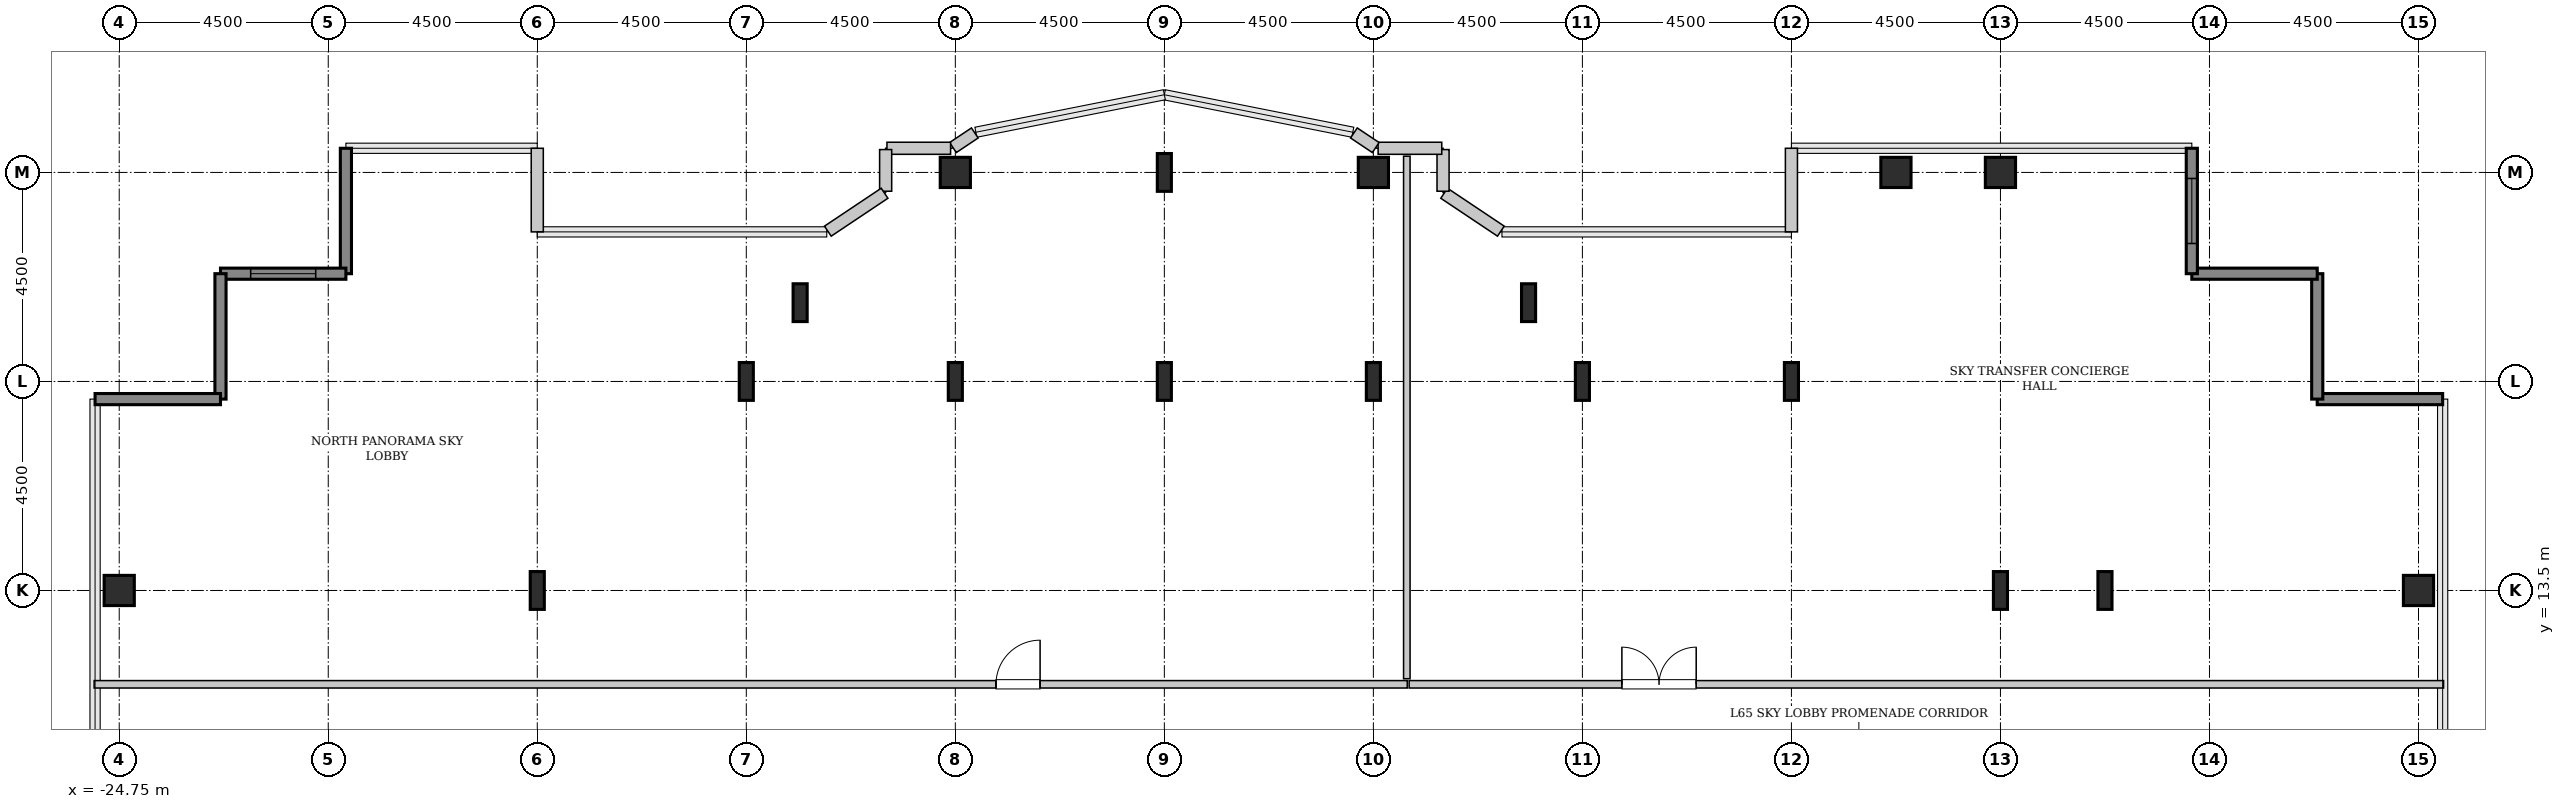
"""IFC4 building model, lengths in metres.
Left out: names, types, materials, properties, quantities, classifications, styles, units other than length and angle.
Written with IfcOpenShell. Run it as: python <this file> out.ifc"""

import sys

from ifc_helpers import new_model, si_unit, direction, frame, frame_2d, origin, origin_2d, place, context, subcontext, project, spatial, rectangle, hollow_rectangle, i_section, extrude, source, transform, mapped, element, fill, save


model = new_model("IFC4")
c1 = context("Model", 3, precision=1e-05, world=origin(), true_north=direction((0.0, 1.0)))
c2 = subcontext(c1, "Body", "Model", "MODEL_VIEW")
j1 = project(units=[si_unit("LENGTHUNIT", "METRE"), si_unit("PLANEANGLEUNIT", "RADIAN")], contexts=[c1])
p1 = place(None, origin())
s1 = spatial("IfcSite", under=j1, at=p1, CompositionType="ELEMENT")
p2 = place(p1, origin())
s2 = spatial("IfcBuilding", under=s1, at=p2, CompositionType="ELEMENT")
p3 = place(p2, frame((0.0, 0.0, 259.8)))
s3 = spatial("IfcBuildingStorey", under=s2, at=p3, CompositionType="ELEMENT", Elevation=259.8)
m1 = source(origin(), c2, "Body", "SweptSolid", [
    extrude(hollow_rectangle(XDim=0.65, YDim=0.65, WallThickness=0.032, InnerFilletRadius=0.032, OuterFilletRadius=0.064, at=origin_2d()), origin(), (0.0, 0.0, 1.0), 4.8),
])
p4 = place(p3, frame((-24.75, 13.5, 0.0), z_axis=(0.0, 0.0, 1.0), x_axis=(1.0, 0.0, 0.0)))
e1 = element("IfcColumn", 1, at=p4, inside=s3, PredefinedType="COLUMN", context=c2, shape_type="MappedRepresentation", body=[
    mapped(m1, transform((0.0, 0.0, 0.0), x_axis=(1.0, 0.0, 0.0), y_axis=(0.0, 1.0, 0.0), z_axis=(0.0, 0.0, 1.0), scale=1.0)),
])
m2 = source(origin(), c2, "Body", "SweptSolid", [
    extrude(i_section(OverallWidth=0.303, OverallDepth=0.814, WebThickness=0.021, FlangeThickness=0.04, FilletRadius=0.03, at=origin_2d()), origin(), (0.0, 0.0, 1.0), 4.8),
])
for number, where, z_axis, x_axis in (
    (2, (-15.75, 13.5, 0.0), (0.0, 0.0, 1.0), (1.0, 0.0, 0.0)),
    (3, (-11.25, 18.0, 0.0), (0.0, 0.0, 1.0), (1.0, 0.0, 0.0)),
    (4, (-10.091, 19.696, 0.0), (0.0, 0.0, 1.0), (1.0, 0.0, 0.0)),
    (5, (-6.75, 18.0, 0.0), (0.0, 0.0, 1.0), (1.0, 0.0, 0.0)),
):
    element("IfcColumn", number, at=place(p3, frame(where, z_axis=z_axis, x_axis=x_axis)), inside=s3, PredefinedType="COLUMN", context=c2, shape_type="MappedRepresentation", body=[
        mapped(m2, transform((0.0, 0.0, 0.0), x_axis=(1.0, 0.0, 0.0), y_axis=(0.0, 1.0, 0.0), z_axis=(0.0, 0.0, 1.0), scale=1.0)),
    ])
p5 = place(p3, frame((-6.75, 22.5, 0.0), z_axis=(0.0, 0.0, 1.0), x_axis=(1.0, 0.0, 0.0)))
e6 = element("IfcColumn", 6, at=p5, inside=s3, PredefinedType="COLUMN", context=c2, shape_type="MappedRepresentation", body=[
    mapped(m1, transform((0.0, 0.0, 0.0), x_axis=(1.0, 0.0, 0.0), y_axis=(0.0, 1.0, 0.0), z_axis=(0.0, 0.0, 1.0), scale=1.0)),
])
for number, where, z_axis, x_axis in (
    (7, (-2.25, 18.0, 0.0), (0.0, 0.0, 1.0), (1.0, 0.0, 0.0)),
    (8, (-2.25, 22.5, 0.0), (0.0, 0.0, 1.0), (1.0, 0.0, 0.0)),
    (9, (2.25, 18.0, 0.0), (0.0, 0.0, 1.0), (1.0, 0.0, 0.0)),
):
    element("IfcColumn", number, at=place(p3, frame(where, z_axis=z_axis, x_axis=x_axis)), inside=s3, PredefinedType="COLUMN", context=c2, shape_type="MappedRepresentation", body=[
        mapped(m2, transform((0.0, 0.0, 0.0), x_axis=(1.0, 0.0, 0.0), y_axis=(0.0, 1.0, 0.0), z_axis=(0.0, 0.0, 1.0), scale=1.0)),
    ])
p6 = place(p3, frame((2.25, 22.5, 0.0), z_axis=(0.0, 0.0, 1.0), x_axis=(1.0, 0.0, 0.0)))
e10 = element("IfcColumn", 10, at=p6, inside=s3, PredefinedType="COLUMN", context=c2, shape_type="MappedRepresentation", body=[
    mapped(m1, transform((0.0, 0.0, 0.0), x_axis=(1.0, 0.0, 0.0), y_axis=(0.0, 1.0, 0.0), z_axis=(0.0, 0.0, 1.0), scale=1.0)),
])
for number, where, z_axis, x_axis in (
    (11, (5.591, 19.696, 0.0), (0.0, 0.0, 1.0), (1.0, 0.0, 0.0)),
    (12, (6.75, 18.0, 0.0), (0.0, 0.0, 1.0), (1.0, 0.0, 0.0)),
    (13, (11.25, 18.0, 0.0), (0.0, 0.0, 1.0), (1.0, 0.0, 0.0)),
):
    element("IfcColumn", number, at=place(p3, frame(where, z_axis=z_axis, x_axis=x_axis)), inside=s3, PredefinedType="COLUMN", context=c2, shape_type="MappedRepresentation", body=[
        mapped(m2, transform((0.0, 0.0, 0.0), x_axis=(1.0, 0.0, 0.0), y_axis=(0.0, 1.0, 0.0), z_axis=(0.0, 0.0, 1.0), scale=1.0)),
    ])
p7 = place(p3, frame((13.5, 22.5, 0.0), z_axis=(0.0, 0.0, 1.0), x_axis=(1.0, 0.0, 0.0)))
e14 = element("IfcColumn", 14, at=p7, inside=s3, PredefinedType="COLUMN", context=c2, shape_type="MappedRepresentation", body=[
    mapped(m1, transform((0.0, 0.0, 0.0), x_axis=(1.0, 0.0, 0.0), y_axis=(0.0, 1.0, 0.0), z_axis=(0.0, 0.0, 1.0), scale=1.0)),
])
p8 = place(p3, frame((15.75, 13.5, 0.0), z_axis=(0.0, 0.0, 1.0), x_axis=(1.0, 0.0, 0.0)))
e15 = element("IfcColumn", 15, at=p8, inside=s3, PredefinedType="COLUMN", context=c2, shape_type="MappedRepresentation", body=[
    mapped(m2, transform((0.0, 0.0, 0.0), x_axis=(1.0, 0.0, 0.0), y_axis=(0.0, 1.0, 0.0), z_axis=(0.0, 0.0, 1.0), scale=1.0)),
])
p9 = place(p3, frame((15.75, 22.5, 0.0), z_axis=(0.0, 0.0, 1.0), x_axis=(1.0, 0.0, 0.0)))
e16 = element("IfcColumn", 16, at=p9, inside=s3, PredefinedType="COLUMN", context=c2, shape_type="MappedRepresentation", body=[
    mapped(m1, transform((0.0, 0.0, 0.0), x_axis=(1.0, 0.0, 0.0), y_axis=(0.0, 1.0, 0.0), z_axis=(0.0, 0.0, 1.0), scale=1.0)),
])
p10 = place(p3, frame((18.0, 13.5, 0.0), z_axis=(0.0, 0.0, 1.0), x_axis=(1.0, 0.0, 0.0)))
e17 = element("IfcColumn", 17, at=p10, inside=s3, PredefinedType="COLUMN", context=c2, shape_type="MappedRepresentation", body=[
    mapped(m2, transform((0.0, 0.0, 0.0), x_axis=(1.0, 0.0, 0.0), y_axis=(0.0, 1.0, 0.0), z_axis=(0.0, 0.0, 1.0), scale=1.0)),
])
p11 = place(p3, frame((24.75, 13.5, 0.0), z_axis=(0.0, 0.0, 1.0), x_axis=(1.0, 0.0, 0.0)))
e18 = element("IfcColumn", 18, at=p11, inside=s3, PredefinedType="COLUMN", context=c2, shape_type="MappedRepresentation", body=[
    mapped(m1, transform((0.0, 0.0, 0.0), x_axis=(1.0, 0.0, 0.0), y_axis=(0.0, 1.0, 0.0), z_axis=(0.0, 0.0, 1.0), scale=1.0)),
])
m3 = source(origin(), c2, "Body", "SweptSolid", [
    extrude(rectangle(XDim=2.7, YDim=0.24, at=frame_2d((1.35, 0.0))), origin(), (0.0, 0.0, 1.0), 4.55),
])
for number, where, z_axis, x_axis in (
    (19, (25.27, 17.62, 0.0), (0.0, 0.0, 1.0), (-1.0, 0.0, 0.0)),
    (20, (22.57, 17.62, 0.0), (0.0, 0.0, 1.0), (0.0, 1.0, 0.0)),
    (21, (22.57, 20.32, 0.0), (0.0, 0.0, 1.0), (-1.0, 0.0, 0.0)),
):
    element("IfcWall", number, at=place(p3, frame(where, z_axis=z_axis, x_axis=x_axis)), inside=s3, PredefinedType="SHEAR", context=c2, shape_type="MappedRepresentation", body=[
        mapped(m3, transform((0.0, 0.0, 0.0), x_axis=(1.0, 0.0, 0.0), y_axis=(0.0, 1.0, 0.0), z_axis=(0.0, 0.0, 1.0), scale=1.0)),
    ])
p12 = place(p3, frame((19.87, 20.32, 0.0), z_axis=(0.0, 0.0, 1.0), x_axis=(0.0, 1.0, 0.0)))
e22 = element("IfcWall", 22, at=p12, inside=s3, PredefinedType="SHEAR", context=c2, shape_type="MappedRepresentation", body=[
    mapped(m3, transform((0.0, 0.0, 0.0), x_axis=(1.0, 0.0, 0.0), y_axis=(0.0, 1.0, 0.0), z_axis=(0.0, 0.0, 1.0), scale=1.0)),
])
p13 = place(p12, frame((0.65, 0.0, 0.85)))
e23 = element("IfcOpeningElement", 23, at=p13, cuts=e22, PredefinedType="OPENING", context=c2, shape_type="SweptSolid", body=[
    extrude(rectangle(XDim=1.4, YDim=1.8, at=frame_2d((0.7, 0.9))), frame((0.0, 0.13, 0.0), z_axis=(0.0, -1.0, 0.0), x_axis=(1.0, 0.0, 0.0)), (0.0, 0.0, 1.0), 0.26),
])
m4 = source(origin(), c2, "Body", "SweptSolid", [
    extrude(rectangle(XDim=1.8, YDim=0.26, at=frame_2d((0.9, 0.0))), origin(), (0.0, 0.0, 1.0), 4.55),
])
p14 = place(p3, frame((11.25, 23.02, 0.0), z_axis=(0.0, 0.0, 1.0), x_axis=(0.0, -1.0, 0.0)))
e24 = element("IfcWall", 24, at=p14, inside=s3, PredefinedType="SOLIDWALL", context=c2, shape_type="MappedRepresentation", body=[
    mapped(m4, transform((0.0, 0.0, 0.0), x_axis=(1.0, 0.0, 0.0), y_axis=(0.0, 1.0, 0.0), z_axis=(0.0, 0.0, 1.0), scale=1.0)),
])
m5 = source(origin(), c2, "Body", "SweptSolid", [
    extrude(rectangle(XDim=1.469, YDim=0.26, at=frame_2d((0.734, 0.0))), origin(), (0.0, 0.0, 1.0), 4.55),
])
p15 = place(p3, frame((4.995, 21.236, 0.0), z_axis=(0.0, 0.0, 1.0), x_axis=(-0.831461760506, 0.555581983884, 0.0)))
e25 = element("IfcWall", 25, at=p15, inside=s3, PredefinedType="SOLIDWALL", context=c2, shape_type="MappedRepresentation", body=[
    mapped(m5, transform((0.0, 0.0, 0.0), x_axis=(1.0, 0.0, 0.0), y_axis=(0.0, 1.0, 0.0), z_axis=(0.0, 0.0, 1.0), scale=1.0)),
])
m6 = source(origin(), c2, "Body", "SweptSolid", [
    extrude(rectangle(XDim=0.897, YDim=0.26, at=frame_2d((0.448, 0.0))), origin(), (0.0, 0.0, 1.0), 4.55),
])
p16 = place(p3, frame((3.75, 22.095, 0.0), z_axis=(0.0, 0.0, 1.0), x_axis=(0.0, 1.0, 0.0)))
e26 = element("IfcWall", 26, at=p16, inside=s3, PredefinedType="SOLIDWALL", context=c2, shape_type="MappedRepresentation", body=[
    mapped(m6, transform((0.0, 0.0, 0.0), x_axis=(1.0, 0.0, 0.0), y_axis=(0.0, 1.0, 0.0), z_axis=(0.0, 0.0, 1.0), scale=1.0)),
])
m7 = source(origin(), c2, "Body", "SweptSolid", [
    extrude(rectangle(XDim=1.37, YDim=0.26, at=frame_2d((0.685, 0.0))), origin(), (0.0, 0.0, 1.0), 4.55),
])
p17 = place(p3, frame((3.722, 23.02, 0.0), z_axis=(0.0, 0.0, 1.0), x_axis=(-1.0, 0.0, 0.0)))
e27 = element("IfcWall", 27, at=p17, inside=s3, PredefinedType="SOLIDWALL", context=c2, shape_type="MappedRepresentation", body=[
    mapped(m7, transform((0.0, 0.0, 0.0), x_axis=(1.0, 0.0, 0.0), y_axis=(0.0, 1.0, 0.0), z_axis=(0.0, 0.0, 1.0), scale=1.0)),
])
m8 = source(origin(), c2, "Body", "SweptSolid", [
    extrude(rectangle(XDim=0.565, YDim=0.26, at=frame_2d((0.283, 0.0))), origin(), (0.0, 0.0, 1.0), 4.55),
])
for number, where, z_axis, x_axis in (
    (28, (2.301, 23.036, 0.0), (0.0, 0.0, 1.0), (-0.832, 0.555, 0.0)),
    (29, (-6.331, 23.35, 0.0), (0.0, 0.0, 1.0), (-0.832, -0.555, 0.0)),
):
    element("IfcWall", number, at=place(p3, frame(where, z_axis=z_axis, x_axis=x_axis)), inside=s3, PredefinedType="SOLIDWALL", context=c2, shape_type="MappedRepresentation", body=[
        mapped(m8, transform((0.0, 0.0, 0.0), x_axis=(1.0, 0.0, 0.0), y_axis=(0.0, 1.0, 0.0), z_axis=(0.0, 0.0, 1.0), scale=1.0)),
    ])
p18 = place(p3, frame((-6.852, 23.02, 0.0), z_axis=(0.0, 0.0, 1.0), x_axis=(-1.0, 0.0, 0.0)))
e30 = element("IfcWall", 30, at=p18, inside=s3, PredefinedType="SOLIDWALL", context=c2, shape_type="MappedRepresentation", body=[
    mapped(m7, transform((0.0, 0.0, 0.0), x_axis=(1.0, 0.0, 0.0), y_axis=(0.0, 1.0, 0.0), z_axis=(0.0, 0.0, 1.0), scale=1.0)),
])
p19 = place(p3, frame((-8.25, 22.992, 0.0), z_axis=(0.0, 0.0, 1.0), x_axis=(0.0, -1.0, 0.0)))
e31 = element("IfcWall", 31, at=p19, inside=s3, PredefinedType="SOLIDWALL", context=c2, shape_type="MappedRepresentation", body=[
    mapped(m6, transform((0.0, 0.0, 0.0), x_axis=(1.0, 0.0, 0.0), y_axis=(0.0, 1.0, 0.0), z_axis=(0.0, 0.0, 1.0), scale=1.0)),
])
p20 = place(p3, frame((-8.273, 22.052, 0.0), z_axis=(0.0, 0.0, 1.0), x_axis=(-0.831461760506, -0.555581983884, 0.0)))
e32 = element("IfcWall", 32, at=p20, inside=s3, PredefinedType="SOLIDWALL", context=c2, shape_type="MappedRepresentation", body=[
    mapped(m5, transform((0.0, 0.0, 0.0), x_axis=(1.0, 0.0, 0.0), y_axis=(0.0, 1.0, 0.0), z_axis=(0.0, 0.0, 1.0), scale=1.0)),
])
p21 = place(p3, frame((-15.75, 21.22, 0.0), z_axis=(0.0, 0.0, 1.0), x_axis=(0.0, 1.0, 0.0)))
e33 = element("IfcWall", 33, at=p21, inside=s3, PredefinedType="SOLIDWALL", context=c2, shape_type="MappedRepresentation", body=[
    mapped(m4, transform((0.0, 0.0, 0.0), x_axis=(1.0, 0.0, 0.0), y_axis=(0.0, 1.0, 0.0), z_axis=(0.0, 0.0, 1.0), scale=1.0)),
])
p22 = place(p3, frame((-19.87, 23.02, 0.0), z_axis=(0.0, 0.0, 1.0), x_axis=(0.0, -1.0, 0.0)))
e34 = element("IfcWall", 34, at=p22, inside=s3, PredefinedType="SHEAR", context=c2, shape_type="MappedRepresentation", body=[
    mapped(m3, transform((0.0, 0.0, 0.0), x_axis=(1.0, 0.0, 0.0), y_axis=(0.0, 1.0, 0.0), z_axis=(0.0, 0.0, 1.0), scale=1.0)),
])
p23 = place(p3, frame((-19.87, 20.32, 0.0), z_axis=(0.0, 0.0, 1.0), x_axis=(-1.0, 0.0, 0.0)))
e35 = element("IfcWall", 35, at=p23, inside=s3, PredefinedType="SHEAR", context=c2, shape_type="MappedRepresentation", body=[
    mapped(m3, transform((0.0, 0.0, 0.0), x_axis=(1.0, 0.0, 0.0), y_axis=(0.0, 1.0, 0.0), z_axis=(0.0, 0.0, 1.0), scale=1.0)),
])
p24 = place(p23, frame((0.65, 0.0, 0.85)))
e36 = element("IfcOpeningElement", 36, at=p24, cuts=e35, PredefinedType="OPENING", context=c2, shape_type="SweptSolid", body=[
    extrude(rectangle(XDim=1.4, YDim=1.8, at=frame_2d((0.7, 0.9))), frame((0.0, 0.13, 0.0), z_axis=(0.0, -1.0, 0.0), x_axis=(1.0, 0.0, 0.0)), (0.0, 0.0, 1.0), 0.26),
])
for number, where, z_axis, x_axis in (
    (37, (-22.57, 20.32, 0.0), (0.0, 0.0, 1.0), (0.0, -1.0, 0.0)),
    (38, (-22.57, 17.62, 0.0), (0.0, 0.0, 1.0), (-1.0, 0.0, 0.0)),
):
    element("IfcWall", number, at=place(p3, frame(where, z_axis=z_axis, x_axis=x_axis)), inside=s3, PredefinedType="SHEAR", context=c2, shape_type="MappedRepresentation", body=[
        mapped(m3, transform((0.0, 0.0, 0.0), x_axis=(1.0, 0.0, 0.0), y_axis=(0.0, 1.0, 0.0), z_axis=(0.0, 0.0, 1.0), scale=1.0)),
    ])
m9 = source(origin(), c2, "Body", "SweptSolid", [
    extrude(rectangle(XDim=28.27, YDim=0.16, at=frame_2d((14.135, 0.0))), origin(), (0.0, 0.0, 1.0), 4.535),
])
p25 = place(p3, frame((-25.29, 11.48, 0.0), z_axis=(0.0, 0.0, 1.0), x_axis=(1.0, 0.0, 0.0)))
e39 = element("IfcWall", 39, at=p25, inside=s3, PredefinedType="PARTITIONING", context=c2, shape_type="MappedRepresentation", body=[
    mapped(m9, transform((0.0, 0.0, 0.0), x_axis=(1.0, 0.0, 0.0), y_axis=(0.0, 1.0, 0.0), z_axis=(0.0, 0.0, 1.0), scale=1.0)),
])
p26 = place(p25, frame((19.415, 0.0, 0.0)))
e40 = element("IfcOpeningElement", 40, at=p26, cuts=e39, PredefinedType="OPENING", context=c2, shape_type="SweptSolid", body=[
    extrude(rectangle(XDim=0.95, YDim=2.1, at=frame_2d((0.475, 1.05))), frame((0.0, 0.09, 0.0), z_axis=(0.0, -1.0, 0.0), x_axis=(1.0, 0.0, 0.0)), (0.0, 0.0, 1.0), 0.18),
])
m10 = source(origin(), c2, "Body", "SweptSolid", [
    extrude(rectangle(XDim=11.25, YDim=0.14, at=frame_2d((5.625, 0.0))), origin(), (0.0, 0.0, 1.0), 4.535),
])
p27 = place(p3, frame((2.97, 11.6, 0.0), z_axis=(0.0, 0.0, 1.0), x_axis=(0.0, 1.0, 0.0)))
e41 = element("IfcWall", 41, at=p27, inside=s3, PredefinedType="PARTITIONING", context=c2, shape_type="MappedRepresentation", body=[
    mapped(m10, transform((0.0, 0.0, 0.0), x_axis=(1.0, 0.0, 0.0), y_axis=(0.0, 1.0, 0.0), z_axis=(0.0, 0.0, 1.0), scale=1.0)),
])
m11 = source(origin(), c2, "Body", "SweptSolid", [
    extrude(rectangle(XDim=22.27, YDim=0.16, at=frame_2d((11.135, 0.0))), origin(), (0.0, 0.0, 1.0), 4.535),
])
p28 = place(p3, frame((3.02, 11.48, 0.0), z_axis=(0.0, 0.0, 1.0), x_axis=(1.0, 0.0, 0.0)))
e42 = element("IfcWall", 42, at=p28, inside=s3, PredefinedType="PARTITIONING", context=c2, shape_type="MappedRepresentation", body=[
    mapped(m11, transform((0.0, 0.0, 0.0), x_axis=(1.0, 0.0, 0.0), y_axis=(0.0, 1.0, 0.0), z_axis=(0.0, 0.0, 1.0), scale=1.0)),
])
p29 = place(p28, frame((4.58, 0.0, 0.0)))
e43 = element("IfcOpeningElement", 43, at=p29, cuts=e42, PredefinedType="OPENING", context=c2, shape_type="SweptSolid", body=[
    extrude(rectangle(XDim=1.6, YDim=2.3, at=frame_2d((0.8, 1.15))), frame((0.0, 0.09, 0.0), z_axis=(0.0, -1.0, 0.0), x_axis=(1.0, 0.0, 0.0)), (0.0, 0.0, 1.0), 0.18),
])
m12 = source(origin(), c2, "Body", "SweptSolid", [
    extrude(rectangle(XDim=1.4, YDim=1.8, at=frame_2d((0.7, 0.9))), frame((0.0, 0.03, 0.0), z_axis=(0.0, -1.0, 0.0), x_axis=(1.0, 0.0, 0.0)), (0.0, 0.0, 1.0), 0.06),
])
p30 = place(p13, origin())
e44 = element("IfcWindow", 44, at=p30, inside=s3, PartitioningType="SINGLE_PANEL", PredefinedType="WINDOW", context=c2, shape_type="MappedRepresentation", body=[
    mapped(m12, transform((0.0, 0.0, 0.0), x_axis=(1.0, 0.0, 0.0), y_axis=(0.0, 1.0, 0.0), z_axis=(0.0, 0.0, 1.0), scale=1.0)),
])
fill(e23, e44)
p31 = place(p24, origin())
e45 = element("IfcWindow", 45, at=p31, inside=s3, PartitioningType="SINGLE_PANEL", PredefinedType="WINDOW", context=c2, shape_type="MappedRepresentation", body=[
    mapped(m12, transform((0.0, 0.0, 0.0), x_axis=(1.0, 0.0, 0.0), y_axis=(0.0, 1.0, 0.0), z_axis=(0.0, 0.0, 1.0), scale=1.0)),
])
fill(e36, e45)
m13 = source(origin(), c2, "Body", "SweptSolid", [
    extrude(rectangle(XDim=0.95, YDim=2.1, at=frame_2d((0.475, 1.05))), frame((0.0, 0.025, 0.0), z_axis=(0.0, -1.0, 0.0), x_axis=(1.0, 0.0, 0.0)), (0.0, 0.0, 1.0), 0.05),
])
p32 = place(p26, origin())
e46 = element("IfcDoor", 46, at=p32, inside=s3, OperationType="SINGLE_SWING_RIGHT", PredefinedType="DOOR", context=c2, shape_type="MappedRepresentation", body=[
    mapped(m13, transform((0.0, 0.0, 0.0), x_axis=(1.0, 0.0, 0.0), y_axis=(0.0, 1.0, 0.0), z_axis=(0.0, 0.0, 1.0), scale=1.0)),
])
fill(e40, e46)
m14 = source(origin(), c2, "Body", "SweptSolid", [
    extrude(rectangle(XDim=1.6, YDim=2.3, at=frame_2d((0.8, 1.15))), frame((0.0, 0.025, 0.0), z_axis=(0.0, -1.0, 0.0), x_axis=(1.0, 0.0, 0.0)), (0.0, 0.0, 1.0), 0.05),
])
p33 = place(p29, origin())
e47 = element("IfcDoor", 47, at=p33, inside=s3, OperationType="DOUBLE_DOOR_SINGLE_SWING", PredefinedType="DOOR", context=c2, shape_type="MappedRepresentation", body=[
    mapped(m14, transform((0.0, 0.0, 0.0), x_axis=(1.0, 0.0, 0.0), y_axis=(0.0, 1.0, 0.0), z_axis=(0.0, 0.0, 1.0), scale=1.0)),
])
fill(e43, e47)
save(model, sys.argv[1])
